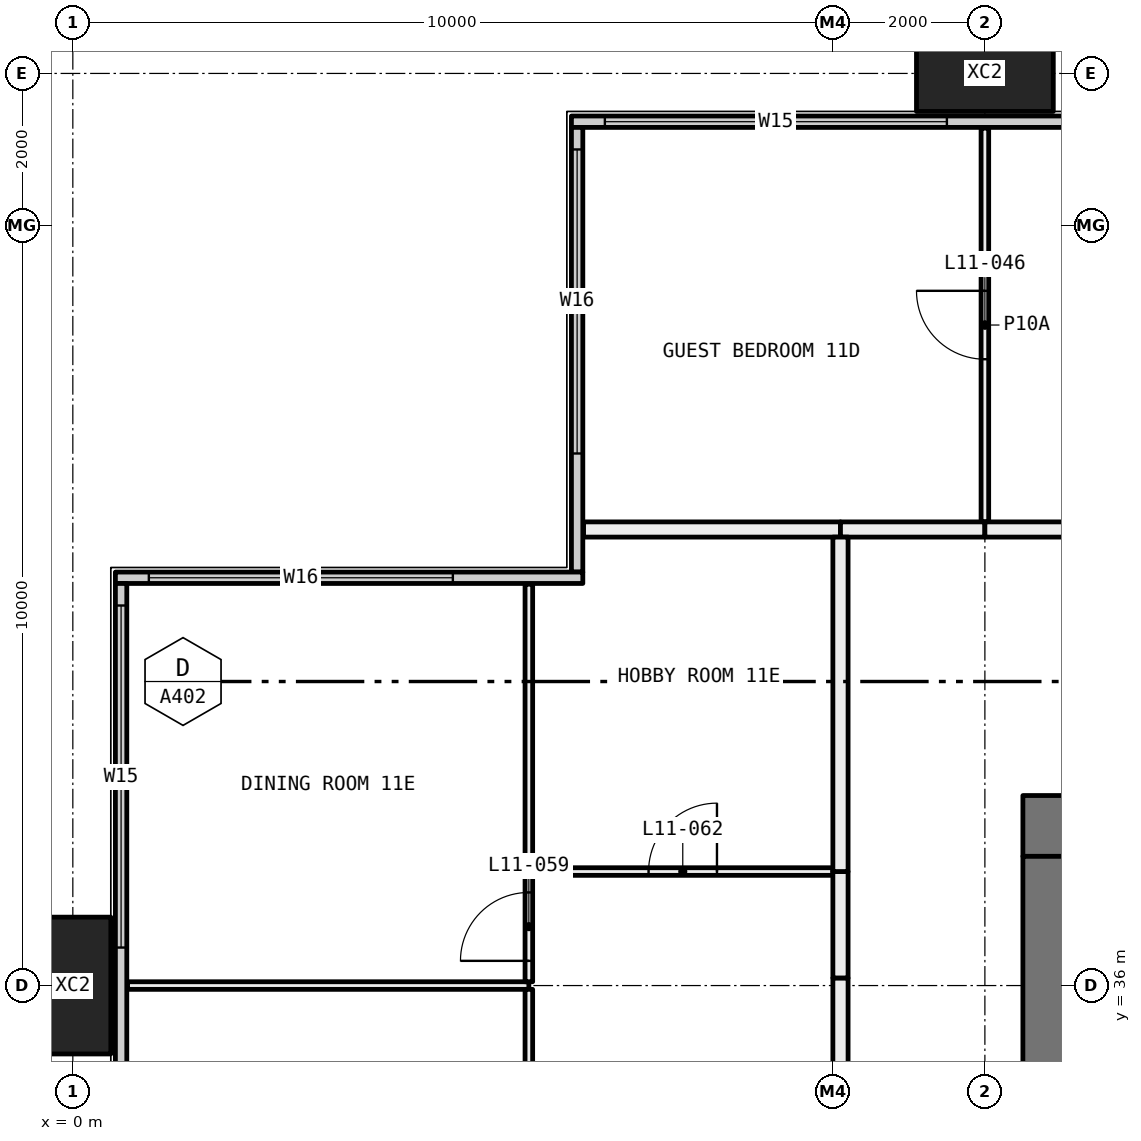
"""IFC4 building model, lengths in metres.
Left out: names, types, materials, properties, quantities, classifications, styles, units other than length and angle.
Written with IfcOpenShell. Run it as: python <this file> out.ifc"""

import sys

from ifc_helpers import new_model, si_unit, direction, frame, frame_2d, origin, origin_2d, place, context, subcontext, project, spatial, rectangle, hollow_rectangle, extrude, element, fill, save


model = new_model("IFC4")
c1 = context("Model", 3, precision=1e-05, world=origin(), true_north=direction((0.0, 1.0)))
c2 = subcontext(c1, "Body", "Model", "MODEL_VIEW")
j1 = project(units=[si_unit("LENGTHUNIT", "METRE"), si_unit("PLANEANGLEUNIT", "RADIAN")], contexts=[c1])
p1 = place(None, origin())
s1 = spatial("IfcSite", under=j1, at=p1, CompositionType="ELEMENT")
p2 = place(p1, origin())
s2 = spatial("IfcBuilding", under=s1, at=p2, CompositionType="ELEMENT")
p3 = place(p2, frame((0.0, 0.0, 50.7)))
s3 = spatial("IfcBuildingStorey", under=s2, at=p3, CompositionType="ELEMENT", Elevation=50.7)
for number, where, z_axis, x_axis in (
    (1, (0.0, 36.0, -0.4), (0.0, 0.0, 1.0), (0.0, 1.0, 0.0)),
    (2, (12.0, 48.0, -0.4), (0.0, 0.0, 1.0), (1.0, 0.0, 0.0)),
):
    element("IfcColumn", number, at=place(p3, frame(where, z_axis=z_axis, x_axis=x_axis)), inside=s3, PredefinedType="COLUMN", context=c2, shape_type="SweptSolid", body=[
        extrude(hollow_rectangle(XDim=1.8, YDim=1.0, WallThickness=0.07, at=origin_2d()), origin(), (0.0, 0.0, 1.0), 3.45),
    ])
p4 = place(p3, frame((6.56, 47.365, 0.0), z_axis=(0.0, 0.0, 1.0), x_axis=(1.0, 0.0, 0.0)))
e3 = element("IfcWall", 3, at=p4, inside=s3, PredefinedType="ELEMENTEDWALL", context=c2, shape_type="SweptSolid", body=[
    extrude(rectangle(XDim=58.88, YDim=0.15, at=frame_2d((29.44, 0.0))), origin(), (0.0, 0.0, 1.0), 3.05),
])
p5 = place(p4, frame((0.44, 0.0, 0.45)))
e4 = element("IfcOpeningElement", 4, at=p5, cuts=e3, PredefinedType="OPENING", context=c2, shape_type="SweptSolid", body=[
    extrude(rectangle(XDim=4.5, YDim=2.55, at=frame_2d((2.25, 1.275))), frame((0.0, 0.085, 0.0), z_axis=(0.0, -1.0, 0.0), x_axis=(1.0, 0.0, 0.0)), (0.0, 0.0, 1.0), 0.17),
])
p6 = place(p4, frame((7.94, 0.0, 0.45)))
e5 = element("IfcOpeningElement", 5, at=p6, cuts=e3, PredefinedType="OPENING", context=c2, shape_type="SweptSolid", body=[
    extrude(rectangle(XDim=3.0, YDim=2.55, at=frame_2d((1.5, 1.275))), frame((0.0, 0.085, 0.0), z_axis=(0.0, -1.0, 0.0), x_axis=(1.0, 0.0, 0.0)), (0.0, 0.0, 1.0), 0.17),
])
p7 = place(p4, frame((11.94, 0.0, 0.45)))
e6 = element("IfcOpeningElement", 6, at=p7, cuts=e3, PredefinedType="OPENING", context=c2, shape_type="SweptSolid", body=[
    extrude(rectangle(XDim=3.0, YDim=2.55, at=frame_2d((1.5, 1.275))), frame((0.0, 0.085, 0.0), z_axis=(0.0, -1.0, 0.0), x_axis=(1.0, 0.0, 0.0)), (0.0, 0.0, 1.0), 0.17),
])
p8 = place(p4, frame((19.94, 0.0, 0.45)))
e7 = element("IfcOpeningElement", 7, at=p8, cuts=e3, PredefinedType="OPENING", context=c2, shape_type="SweptSolid", body=[
    extrude(rectangle(XDim=3.0, YDim=2.55, at=frame_2d((1.5, 1.275))), frame((0.0, 0.085, 0.0), z_axis=(0.0, -1.0, 0.0), x_axis=(1.0, 0.0, 0.0)), (0.0, 0.0, 1.0), 0.17),
])
p9 = place(p4, frame((23.94, 0.0, 0.45)))
e8 = element("IfcOpeningElement", 8, at=p9, cuts=e3, PredefinedType="OPENING", context=c2, shape_type="SweptSolid", body=[
    extrude(rectangle(XDim=2.0, YDim=2.55, at=frame_2d((1.0, 1.275))), frame((0.0, 0.085, 0.0), z_axis=(0.0, -1.0, 0.0), x_axis=(1.0, 0.0, 0.0)), (0.0, 0.0, 1.0), 0.17),
])
p10 = place(p4, frame((31.94, 0.0, 0.45)))
e9 = element("IfcOpeningElement", 9, at=p10, cuts=e3, PredefinedType="OPENING", context=c2, shape_type="SweptSolid", body=[
    extrude(rectangle(XDim=3.0, YDim=2.55, at=frame_2d((1.5, 1.275))), frame((0.0, 0.085, 0.0), z_axis=(0.0, -1.0, 0.0), x_axis=(1.0, 0.0, 0.0)), (0.0, 0.0, 1.0), 0.17),
])
p11 = place(p4, frame((35.94, 0.0, 0.45)))
e10 = element("IfcOpeningElement", 10, at=p11, cuts=e3, PredefinedType="OPENING", context=c2, shape_type="SweptSolid", body=[
    extrude(rectangle(XDim=3.0, YDim=2.55, at=frame_2d((1.5, 1.275))), frame((0.0, 0.085, 0.0), z_axis=(0.0, -1.0, 0.0), x_axis=(1.0, 0.0, 0.0)), (0.0, 0.0, 1.0), 0.17),
])
p12 = place(p4, frame((43.94, 0.0, 0.45)))
e11 = element("IfcOpeningElement", 11, at=p12, cuts=e3, PredefinedType="OPENING", context=c2, shape_type="SweptSolid", body=[
    extrude(rectangle(XDim=3.0, YDim=2.55, at=frame_2d((1.5, 1.275))), frame((0.0, 0.085, 0.0), z_axis=(0.0, -1.0, 0.0), x_axis=(1.0, 0.0, 0.0)), (0.0, 0.0, 1.0), 0.17),
])
p13 = place(p4, frame((47.94, 0.0, 0.45)))
e12 = element("IfcOpeningElement", 12, at=p13, cuts=e3, PredefinedType="OPENING", context=c2, shape_type="SweptSolid", body=[
    extrude(rectangle(XDim=2.0, YDim=2.55, at=frame_2d((1.0, 1.275))), frame((0.0, 0.085, 0.0), z_axis=(0.0, -1.0, 0.0), x_axis=(1.0, 0.0, 0.0)), (0.0, 0.0, 1.0), 0.17),
])
p14 = place(p4, frame((53.94, 0.0, 0.45)))
e13 = element("IfcOpeningElement", 13, at=p14, cuts=e3, PredefinedType="OPENING", context=c2, shape_type="SweptSolid", body=[
    extrude(rectangle(XDim=4.5, YDim=2.55, at=frame_2d((2.25, 1.275))), frame((0.0, 0.085, 0.0), z_axis=(0.0, -1.0, 0.0), x_axis=(1.0, 0.0, 0.0)), (0.0, 0.0, 1.0), 0.17),
])
p15 = place(p3, frame((6.635, 41.44, 0.0), z_axis=(0.0, 0.0, 1.0), x_axis=(0.0, 1.0, 0.0)))
e14 = element("IfcWall", 14, at=p15, inside=s3, PredefinedType="ELEMENTEDWALL", context=c2, shape_type="SweptSolid", body=[
    extrude(rectangle(XDim=5.85, YDim=0.15, at=frame_2d((2.925, 0.0))), origin(), (0.0, 0.0, 1.0), 3.05),
])
p16 = place(p15, frame((1.56, 0.0, 0.45)))
e15 = element("IfcOpeningElement", 15, at=p16, cuts=e14, PredefinedType="OPENING", context=c2, shape_type="SweptSolid", body=[
    extrude(rectangle(XDim=4.0, YDim=2.55, at=frame_2d((2.0, 1.275))), frame((0.0, 0.085, 0.0), z_axis=(0.0, -1.0, 0.0), x_axis=(1.0, 0.0, 0.0)), (0.0, 0.0, 1.0), 0.17),
])
p17 = place(p3, frame((0.56, 41.365, 0.0), z_axis=(0.0, 0.0, 1.0), x_axis=(1.0, 0.0, 0.0)))
e16 = element("IfcWall", 16, at=p17, inside=s3, PredefinedType="ELEMENTEDWALL", context=c2, shape_type="SweptSolid", body=[
    extrude(rectangle(XDim=6.15, YDim=0.15, at=frame_2d((3.075, 0.0))), origin(), (0.0, 0.0, 1.0), 3.05),
])
p18 = place(p17, frame((0.44, 0.0, 0.45)))
e17 = element("IfcOpeningElement", 17, at=p18, cuts=e16, PredefinedType="OPENING", context=c2, shape_type="SweptSolid", body=[
    extrude(rectangle(XDim=4.0, YDim=2.55, at=frame_2d((2.0, 1.275))), frame((0.0, 0.085, 0.0), z_axis=(0.0, -1.0, 0.0), x_axis=(1.0, 0.0, 0.0)), (0.0, 0.0, 1.0), 0.17),
])
p19 = place(p3, frame((0.635, 6.71, 0.0), z_axis=(0.0, 0.0, 1.0), x_axis=(0.0, 1.0, 0.0)))
e18 = element("IfcWall", 18, at=p19, inside=s3, PredefinedType="ELEMENTEDWALL", context=c2, shape_type="SweptSolid", body=[
    extrude(rectangle(XDim=34.58, YDim=0.15, at=frame_2d((17.29, 0.0))), origin(), (0.0, 0.0, 1.0), 3.05),
])
p20 = place(p19, frame((0.29, 0.0, 0.45)))
e19 = element("IfcOpeningElement", 19, at=p20, cuts=e18, PredefinedType="OPENING", context=c2, shape_type="SweptSolid", body=[
    extrude(rectangle(XDim=4.5, YDim=2.55, at=frame_2d((2.25, 1.275))), frame((0.0, 0.085, 0.0), z_axis=(0.0, -1.0, 0.0), x_axis=(1.0, 0.0, 0.0)), (0.0, 0.0, 1.0), 0.17),
])
p21 = place(p19, frame((7.79, 0.0, 0.45)))
e20 = element("IfcOpeningElement", 20, at=p21, cuts=e18, PredefinedType="OPENING", context=c2, shape_type="SweptSolid", body=[
    extrude(rectangle(XDim=3.0, YDim=2.55, at=frame_2d((1.5, 1.275))), frame((0.0, 0.085, 0.0), z_axis=(0.0, -1.0, 0.0), x_axis=(1.0, 0.0, 0.0)), (0.0, 0.0, 1.0), 0.17),
])
p22 = place(p19, frame((11.79, 0.0, 0.45)))
e21 = element("IfcOpeningElement", 21, at=p22, cuts=e18, PredefinedType="OPENING", context=c2, shape_type="SweptSolid", body=[
    extrude(rectangle(XDim=3.0, YDim=2.55, at=frame_2d((1.5, 1.275))), frame((0.0, 0.085, 0.0), z_axis=(0.0, -1.0, 0.0), x_axis=(1.0, 0.0, 0.0)), (0.0, 0.0, 1.0), 0.17),
])
p23 = place(p19, frame((19.79, 0.0, 0.45)))
e22 = element("IfcOpeningElement", 22, at=p23, cuts=e18, PredefinedType="OPENING", context=c2, shape_type="SweptSolid", body=[
    extrude(rectangle(XDim=3.0, YDim=2.55, at=frame_2d((1.5, 1.275))), frame((0.0, 0.085, 0.0), z_axis=(0.0, -1.0, 0.0), x_axis=(1.0, 0.0, 0.0)), (0.0, 0.0, 1.0), 0.17),
])
p24 = place(p19, frame((23.79, 0.0, 0.45)))
e23 = element("IfcOpeningElement", 23, at=p24, cuts=e18, PredefinedType="OPENING", context=c2, shape_type="SweptSolid", body=[
    extrude(rectangle(XDim=2.0, YDim=2.55, at=frame_2d((1.0, 1.275))), frame((0.0, 0.085, 0.0), z_axis=(0.0, -1.0, 0.0), x_axis=(1.0, 0.0, 0.0)), (0.0, 0.0, 1.0), 0.17),
])
p25 = place(p19, frame((29.79, 0.0, 0.45)))
e24 = element("IfcOpeningElement", 24, at=p25, cuts=e18, PredefinedType="OPENING", context=c2, shape_type="SweptSolid", body=[
    extrude(rectangle(XDim=4.5, YDim=2.55, at=frame_2d((2.25, 1.275))), frame((0.0, 0.085, 0.0), z_axis=(0.0, -1.0, 0.0), x_axis=(1.0, 0.0, 0.0)), (0.0, 0.0, 1.0), 0.17),
])
p26 = place(p3, frame((12.0, 42.1, 0.0), z_axis=(0.0, 0.0, 1.0), x_axis=(0.0, 1.0, 0.0)))
e25 = element("IfcWall", 25, at=p26, inside=s3, PredefinedType="PARTITIONING", context=c2, shape_type="SweptSolid", body=[
    extrude(rectangle(XDim=5.18, YDim=0.1, at=frame_2d((2.59, 0.0))), origin(), (0.0, 0.0, 1.0), 3.05),
])
p27 = place(p26, frame((2.14, 0.0, 0.0)))
e26 = element("IfcOpeningElement", 26, at=p27, cuts=e25, PredefinedType="OPENING", context=c2, shape_type="SweptSolid", body=[
    extrude(rectangle(XDim=0.9, YDim=2.1, at=frame_2d((0.45, 1.05))), frame((0.0, 0.06, 0.0), z_axis=(0.0, -1.0, 0.0), x_axis=(1.0, 0.0, 0.0)), (0.0, 0.0, 1.0), 0.12),
])
p28 = place(p3, frame((6.72, 42.0, 0.0), z_axis=(0.0, 0.0, 1.0), x_axis=(1.0, 0.0, 0.0)))
e27 = element("IfcWall", 27, at=p28, inside=s3, PredefinedType="PARTITIONING", context=c2, shape_type="SweptSolid", body=[
    extrude(rectangle(XDim=3.38, YDim=0.2, at=frame_2d((1.69, 0.0))), origin(), (0.0, 0.0, 1.0), 3.05),
])
p29 = place(p3, frame((10.1, 42.0, 0.0), z_axis=(0.0, 0.0, 1.0), x_axis=(1.0, 0.0, 0.0)))
e28 = element("IfcWall", 28, at=p29, inside=s3, PredefinedType="PARTITIONING", context=c2, shape_type="SweptSolid", body=[
    extrude(rectangle(XDim=1.9, YDim=0.2, at=frame_2d((0.95, 0.0))), origin(), (0.0, 0.0, 1.0), 3.05),
])
p30 = place(p3, frame((12.0, 42.0, 0.0), z_axis=(0.0, 0.0, 1.0), x_axis=(1.0, 0.0, 0.0)))
e29 = element("IfcWall", 29, at=p30, inside=s3, PredefinedType="PARTITIONING", context=c2, shape_type="SweptSolid", body=[
    extrude(rectangle(XDim=6.0, YDim=0.2, at=frame_2d((3.0, 0.0))), origin(), (0.0, 0.0, 1.0), 3.05),
])
p31 = place(p3, frame((6.0, 36.0, 0.0), z_axis=(0.0, 0.0, 1.0), x_axis=(-1.0, 0.0, 0.0)))
e30 = element("IfcWall", 30, at=p31, inside=s3, PredefinedType="PARTITIONING", context=c2, shape_type="SweptSolid", body=[
    extrude(rectangle(XDim=5.28, YDim=0.1, at=frame_2d((2.64, 0.0))), origin(), (0.0, 0.0, 1.0), 2.45),
])
p32 = place(p3, frame((6.0, 30.05, 0.0), z_axis=(0.0, 0.0, 1.0), x_axis=(0.0, 1.0, 0.0)))
e31 = element("IfcWall", 31, at=p32, inside=s3, PredefinedType="PARTITIONING", context=c2, shape_type="SweptSolid", body=[
    extrude(rectangle(XDim=5.9, YDim=0.1, at=frame_2d((2.95, 0.0))), origin(), (0.0, 0.0, 1.0), 2.45),
])
p33 = place(p32, frame((2.5, 0.0, 0.0)))
e32 = element("IfcOpeningElement", 32, at=p33, cuts=e31, PredefinedType="OPENING", context=c2, shape_type="SweptSolid", body=[
    extrude(rectangle(XDim=0.9, YDim=2.1, at=frame_2d((0.45, 1.05))), frame((0.0, 0.06, 0.0), z_axis=(0.0, -1.0, 0.0), x_axis=(1.0, 0.0, 0.0)), (0.0, 0.0, 1.0), 0.12),
])
p34 = place(p3, frame((6.0, 36.05, 0.0), z_axis=(0.0, 0.0, 1.0), x_axis=(0.0, 1.0, 0.0)))
e33 = element("IfcWall", 33, at=p34, inside=s3, PredefinedType="PARTITIONING", context=c2, shape_type="SweptSolid", body=[
    extrude(rectangle(XDim=1.45, YDim=0.1, at=frame_2d((0.725, 0.0))), origin(), (0.0, 0.0, 1.0), 2.45),
])
p35 = place(p34, frame((0.275, 0.0, 0.0)))
e34 = element("IfcOpeningElement", 34, at=p35, cuts=e33, PredefinedType="OPENING", context=c2, shape_type="SweptSolid", body=[
    extrude(rectangle(XDim=0.9, YDim=2.1, at=frame_2d((0.45, 1.05))), frame((0.0, 0.06, 0.0), z_axis=(0.0, -1.0, 0.0), x_axis=(1.0, 0.0, 0.0)), (0.0, 0.0, 1.0), 0.12),
])
p36 = place(p3, frame((6.0, 37.5, 0.0), z_axis=(0.0, 0.0, 1.0), x_axis=(0.0, 1.0, 0.0)))
e35 = element("IfcWall", 35, at=p36, inside=s3, PredefinedType="PARTITIONING", context=c2, shape_type="SweptSolid", body=[
    extrude(rectangle(XDim=3.78, YDim=0.1, at=frame_2d((1.89, 0.0))), origin(), (0.0, 0.0, 1.0), 3.05),
])
p37 = place(p3, frame((10.0, 37.5, 0.0), z_axis=(0.0, 0.0, 1.0), x_axis=(-1.0, 0.0, 0.0)))
e36 = element("IfcWall", 36, at=p37, inside=s3, PredefinedType="PARTITIONING", context=c2, shape_type="SweptSolid", body=[
    extrude(rectangle(XDim=3.95, YDim=0.1, at=frame_2d((1.975, 0.0))), origin(), (0.0, 0.0, 1.0), 3.05),
])
p38 = place(p37, frame((1.525, 0.0, 0.0)))
e37 = element("IfcOpeningElement", 37, at=p38, cuts=e36, PredefinedType="OPENING", context=c2, shape_type="SweptSolid", body=[
    extrude(rectangle(XDim=0.9, YDim=2.1, at=frame_2d((0.45, 1.05))), frame((0.0, 0.06, 0.0), z_axis=(0.0, -1.0, 0.0), x_axis=(1.0, 0.0, 0.0)), (0.0, 0.0, 1.0), 0.12),
])
p39 = place(p3, frame((10.1, 27.0, 0.0), z_axis=(0.0, 0.0, 1.0), x_axis=(0.0, 1.0, 0.0)))
e38 = element("IfcWall", 38, at=p39, inside=s3, PredefinedType="PARTITIONING", context=c2, shape_type="SweptSolid", body=[
    extrude(rectangle(XDim=9.1, YDim=0.2, at=frame_2d((4.55, 0.0))), origin(), (0.0, 0.0, 1.0), 2.45),
])
p40 = place(p3, frame((10.1, 36.1, 0.0), z_axis=(0.0, 0.0, 1.0), x_axis=(0.0, 1.0, 0.0)))
e39 = element("IfcWall", 39, at=p40, inside=s3, PredefinedType="PARTITIONING", context=c2, shape_type="SweptSolid", body=[
    extrude(rectangle(XDim=1.4, YDim=0.2, at=frame_2d((0.7, 0.0))), origin(), (0.0, 0.0, 1.0), 3.05),
])
p41 = place(p3, frame((10.1, 37.5, 0.0), z_axis=(0.0, 0.0, 1.0), x_axis=(0.0, 1.0, 0.0)))
e40 = element("IfcWall", 40, at=p41, inside=s3, PredefinedType="PARTITIONING", context=c2, shape_type="SweptSolid", body=[
    extrude(rectangle(XDim=4.4, YDim=0.2, at=frame_2d((2.2, 0.0))), origin(), (0.0, 0.0, 1.0), 3.05),
])
p42 = place(p3, frame((12.5, 38.1, 0.0), z_axis=(0.0, 0.0, 1.0), x_axis=(1.0, 0.0, 0.0)))
e41 = element("IfcWall", 41, at=p42, inside=s3, PredefinedType="SHEAR", context=c2, shape_type="SweptSolid", body=[
    extrude(rectangle(XDim=11.0, YDim=0.8, at=frame_2d((5.5, 0.0))), origin(), (0.0, 0.0, 1.0), 3.05),
])
p43 = place(p42, frame((8.4, 0.0, 0.0)))
e42 = element("IfcOpeningElement", 42, at=p43, cuts=e41, PredefinedType="OPENING", context=c2, shape_type="SweptSolid", body=[
    extrude(rectangle(XDim=1.6, YDim=2.1, at=frame_2d((0.8, 1.05))), frame((0.0, 0.41, 0.0), z_axis=(0.0, -1.0, 0.0), x_axis=(1.0, 0.0, 0.0)), (0.0, 0.0, 1.0), 0.82),
])
p44 = place(p3, frame((12.9, 22.3, 0.0), z_axis=(0.0, 0.0, 1.0), x_axis=(0.0, 1.0, 0.0)))
e43 = element("IfcWall", 43, at=p44, inside=s3, PredefinedType="SHEAR", context=c2, shape_type="SweptSolid", body=[
    extrude(rectangle(XDim=15.4, YDim=0.8, at=frame_2d((7.7, 0.0))), origin(), (0.0, 0.0, 1.0), 3.05),
])
p45 = place(p44, frame((8.15, 0.0, 0.0)))
e44 = element("IfcOpeningElement", 44, at=p45, cuts=e43, PredefinedType="OPENING", context=c2, shape_type="SweptSolid", body=[
    extrude(rectangle(XDim=1.6, YDim=2.1, at=frame_2d((0.8, 1.05))), frame((0.0, 0.41, 0.0), z_axis=(0.0, -1.0, 0.0), x_axis=(1.0, 0.0, 0.0)), (0.0, 0.0, 1.0), 0.82),
])
p46 = place(p44, frame((2.05, 0.0, 0.0)))
e45 = element("IfcOpeningElement", 45, at=p46, cuts=e43, PredefinedType="OPENING", context=c2, shape_type="SweptSolid", body=[
    extrude(rectangle(XDim=1.0, YDim=2.1, at=frame_2d((0.5, 1.05))), frame((0.0, 0.41, 0.0), z_axis=(0.0, -1.0, 0.0), x_axis=(1.0, 0.0, 0.0)), (0.0, 0.0, 1.0), 0.82),
])
p47 = place(p5, origin())
e46 = element("IfcWindow", 46, at=p47, inside=s3, PartitioningType="SINGLE_PANEL", PredefinedType="WINDOW", context=c2, shape_type="SweptSolid", body=[
    extrude(rectangle(XDim=4.5, YDim=2.55, at=frame_2d((2.25, 1.275))), frame((0.0, 0.03, 0.0), z_axis=(0.0, -1.0, 0.0), x_axis=(1.0, 0.0, 0.0)), (0.0, 0.0, 1.0), 0.06),
])
fill(e4, e46)
p48 = place(p16, origin())
e47 = element("IfcWindow", 47, at=p48, inside=s3, PartitioningType="SINGLE_PANEL", PredefinedType="WINDOW", context=c2, shape_type="SweptSolid", body=[
    extrude(rectangle(XDim=4.0, YDim=2.55, at=frame_2d((2.0, 1.275))), frame((0.0, 0.03, 0.0), z_axis=(0.0, -1.0, 0.0), x_axis=(1.0, 0.0, 0.0)), (0.0, 0.0, 1.0), 0.06),
])
fill(e15, e47)
p49 = place(p18, origin())
e48 = element("IfcWindow", 48, at=p49, inside=s3, PartitioningType="SINGLE_PANEL", PredefinedType="WINDOW", context=c2, shape_type="SweptSolid", body=[
    extrude(rectangle(XDim=4.0, YDim=2.55, at=frame_2d((2.0, 1.275))), frame((0.0, 0.03, 0.0), z_axis=(0.0, -1.0, 0.0), x_axis=(1.0, 0.0, 0.0)), (0.0, 0.0, 1.0), 0.06),
])
fill(e17, e48)
p50 = place(p25, origin())
e49 = element("IfcWindow", 49, at=p50, inside=s3, PartitioningType="SINGLE_PANEL", PredefinedType="WINDOW", context=c2, shape_type="SweptSolid", body=[
    extrude(rectangle(XDim=4.5, YDim=2.55, at=frame_2d((2.25, 1.275))), frame((0.0, 0.03, 0.0), z_axis=(0.0, -1.0, 0.0), x_axis=(1.0, 0.0, 0.0)), (0.0, 0.0, 1.0), 0.06),
])
fill(e24, e49)
p51 = place(p27, origin())
e50 = element("IfcDoor", 50, at=p51, inside=s3, OperationType="SINGLE_SWING_LEFT", PredefinedType="DOOR", context=c2, shape_type="SweptSolid", body=[
    extrude(rectangle(XDim=0.9, YDim=2.1, at=frame_2d((0.45, 1.05))), frame((0.0, 0.025, 0.0), z_axis=(0.0, -1.0, 0.0), x_axis=(1.0, 0.0, 0.0)), (0.0, 0.0, 1.0), 0.05),
])
fill(e26, e50)
p52 = place(p35, origin())
e51 = element("IfcDoor", 51, at=p52, inside=s3, OperationType="SINGLE_SWING_RIGHT", PredefinedType="DOOR", context=c2, shape_type="SweptSolid", body=[
    extrude(rectangle(XDim=0.9, YDim=2.1, at=frame_2d((0.45, 1.05))), frame((0.0, 0.025, 0.0), z_axis=(0.0, -1.0, 0.0), x_axis=(1.0, 0.0, 0.0)), (0.0, 0.0, 1.0), 0.05),
])
fill(e34, e51)
p53 = place(p38, frame((0.9, 0.0, 0.0), x_axis=(-1.0, 0.0, 0.0)))
e52 = element("IfcDoor", 52, at=p53, inside=s3, OperationType="SINGLE_SWING_LEFT", PredefinedType="DOOR", context=c2, shape_type="SweptSolid", body=[
    extrude(rectangle(XDim=0.9, YDim=2.1, at=frame_2d((0.45, 1.05))), frame((0.0, 0.025, 0.0), z_axis=(0.0, -1.0, 0.0), x_axis=(1.0, 0.0, 0.0)), (0.0, 0.0, 1.0), 0.05),
])
fill(e37, e52)
save(model, sys.argv[1])
